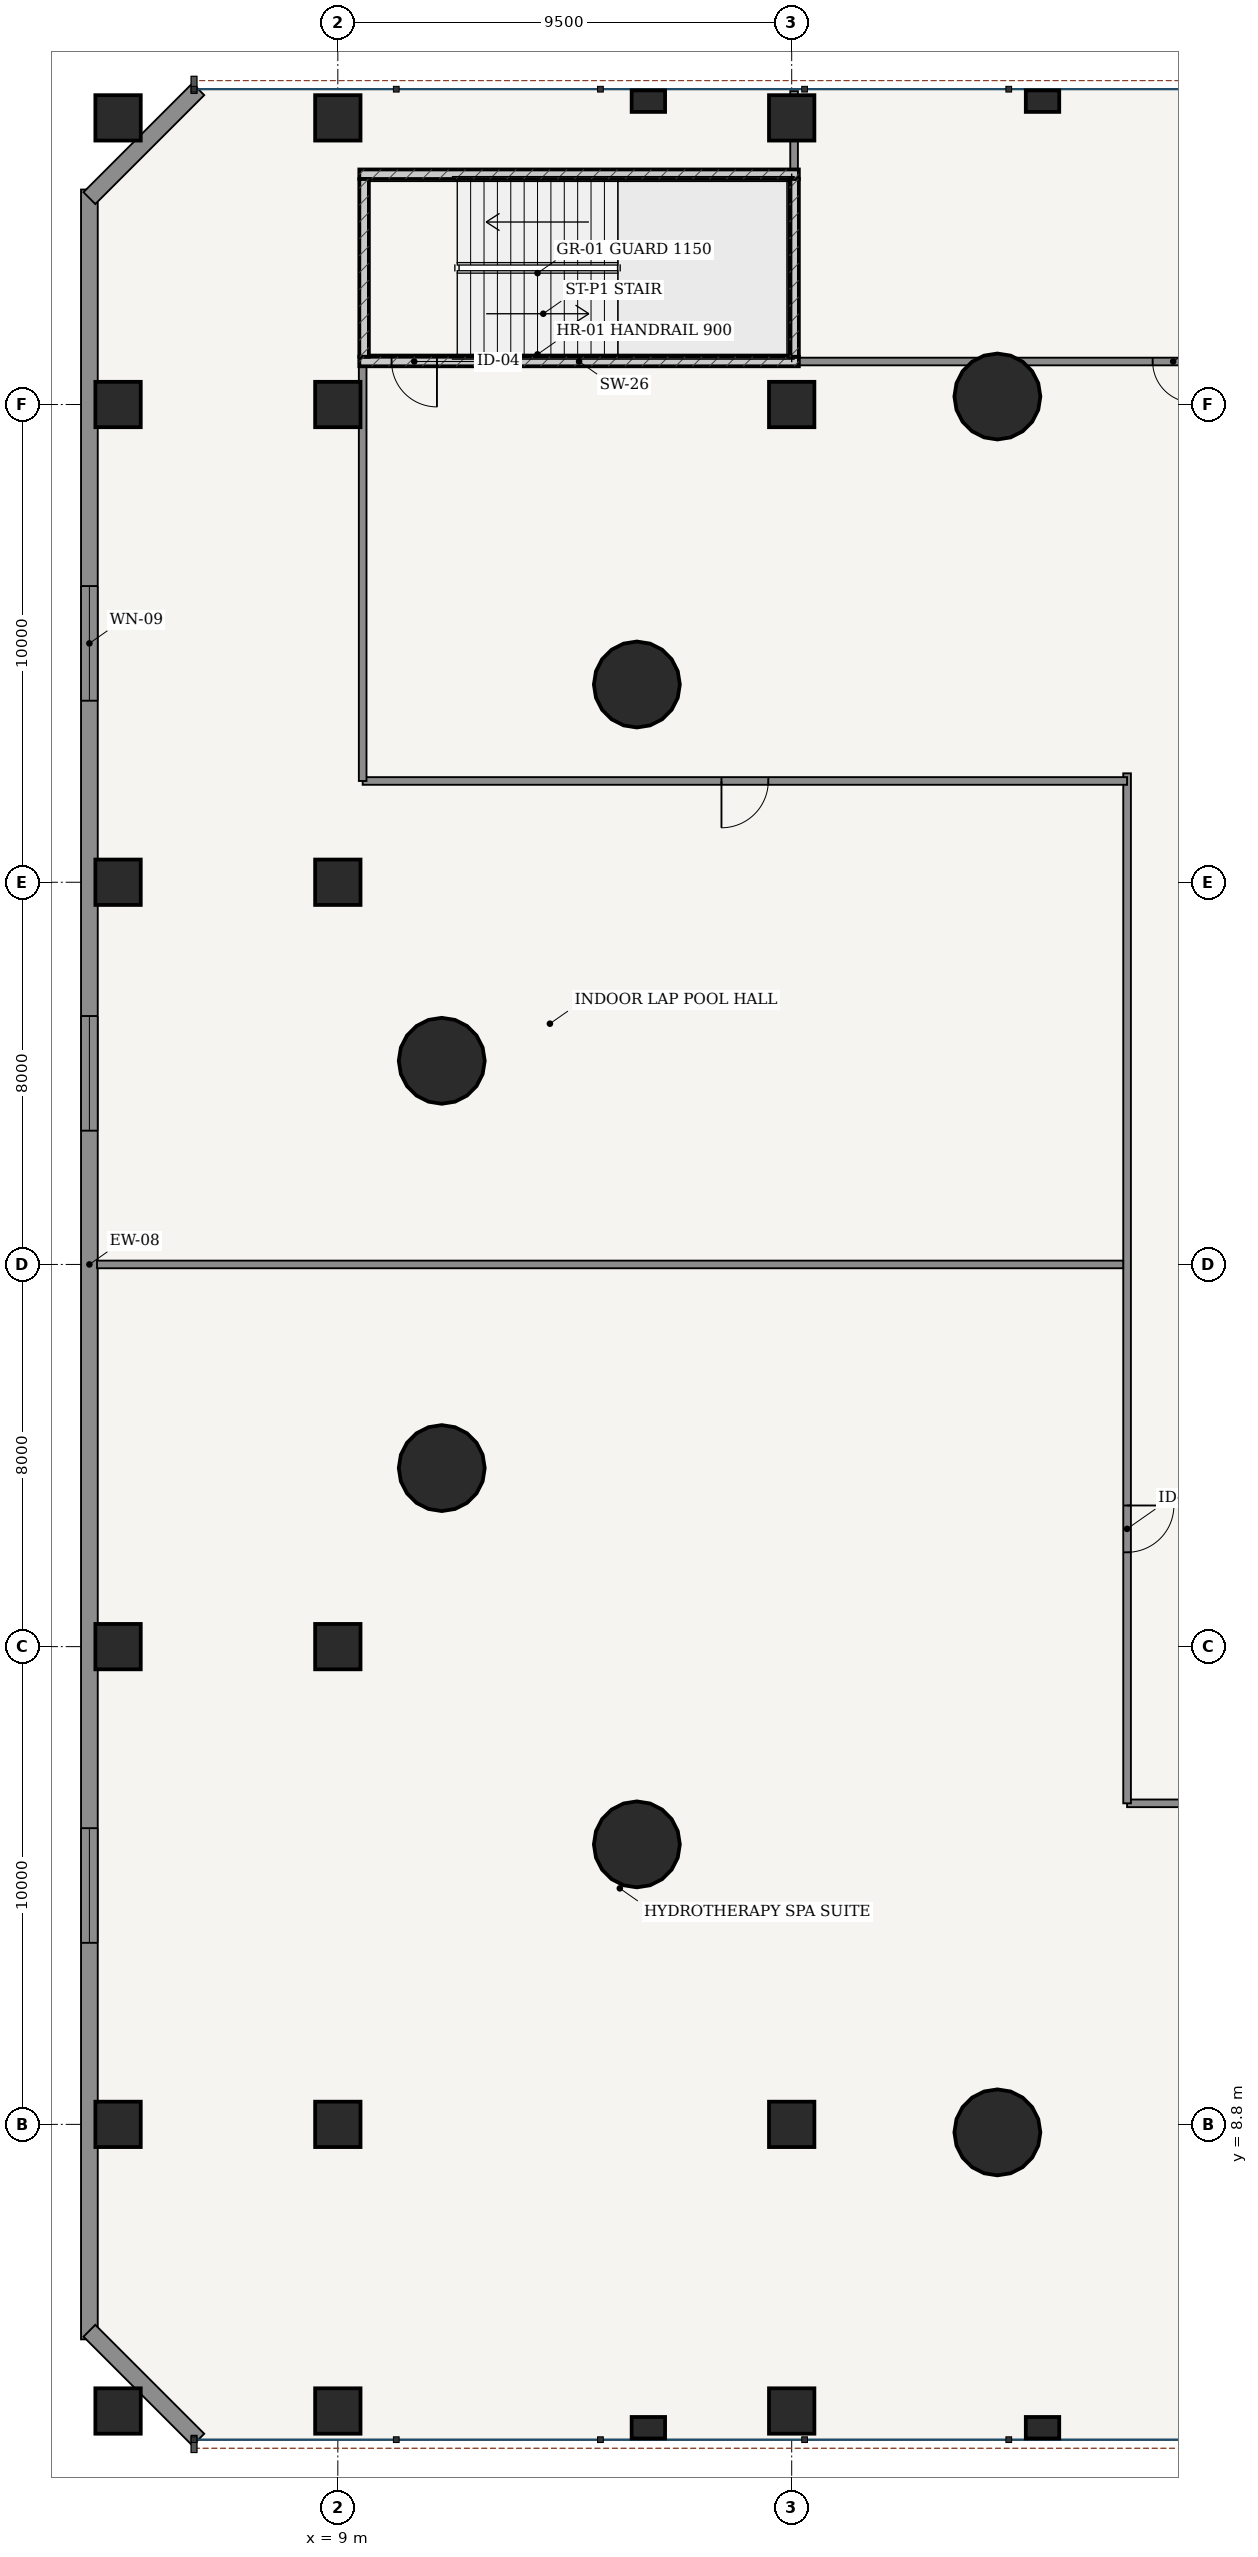
"""IFC4 building model, lengths in metres.
Left out: names, types, materials, properties, quantities, classifications, styles, units other than length and angle.
Written with IfcOpenShell. Run it as: python <this file> out.ifc"""

import sys

from ifc_helpers import new_model, si_unit, direction, frame, frame_2d, origin, origin_2d, place, context, subcontext, project, spatial, rectangle, hollow_circle, extrude, source, transform, mapped, element, fill, save


model = new_model("IFC4")
c1 = context("Model", 3, precision=1e-05, world=origin(), true_north=direction((-0.2419218956, 0.970295726276)))
c2 = subcontext(c1, "Body", "Model", "MODEL_VIEW")
j1 = project(units=[si_unit("LENGTHUNIT", "METRE"), si_unit("PLANEANGLEUNIT", "RADIAN")], contexts=[c1])
p1 = place(None, origin())
s1 = spatial("IfcSite", under=j1, at=p1, CompositionType="ELEMENT")
p2 = place(p1, origin())
s2 = spatial("IfcBuilding", under=s1, at=p2, CompositionType="ELEMENT")
p3 = place(p2, frame((0.0, 0.0, 14.4)))
s3 = spatial("IfcBuildingStorey", under=s2, at=p3, CompositionType="ELEMENT", Elevation=14.4)
p4 = place(p3, frame((9.45, 45.7, 0.0), z_axis=(0.0, 0.0, 1.0), x_axis=(1.0, 0.0, 0.0)))
e1 = element("IfcWall", 1, at=p4, inside=s3, PredefinedType="SOLIDWALL", context=c2, shape_type="SweptSolid", body=[
    extrude(rectangle(XDim=9.2, YDim=0.2, at=frame_2d((4.6, 0.0))), origin(), (0.0, 0.0, 1.0), 4.05),
])
p5 = place(p4, frame((0.675, 0.0, 0.0)))
e2 = element("IfcOpeningElement", 2, at=p5, cuts=e1, PredefinedType="OPENING", context=c2, shape_type="SweptSolid", body=[
    extrude(rectangle(XDim=0.95, YDim=2.15, at=frame_2d((0.475, 1.075))), frame((0.0, 0.11, 0.0), z_axis=(0.0, -1.0, 0.0), x_axis=(1.0, 0.0, 0.0)), (0.0, 0.0, 1.0), 0.22),
])
p6 = place(p3, frame((9.45, 49.62, 0.0), z_axis=(0.0, 0.0, 1.0), x_axis=(1.0, 0.0, 0.0)))
e3 = element("IfcWall", 3, at=p6, inside=s3, PredefinedType="SOLIDWALL", context=c2, shape_type="SweptSolid", body=[
    extrude(rectangle(XDim=9.2, YDim=0.2, at=frame_2d((4.6, 0.0))), origin(), (0.0, 0.0, 1.0), 4.05),
])
for number, where, z_axis, x_axis in (
    (4, (9.55, 45.8, 0.0), (0.0, 0.0, 1.0), (0.0, 1.0, 0.0)),
    (5, (18.55, 45.8, 0.0), (0.0, 0.0, 1.0), (0.0, 1.0, 0.0)),
):
    element("IfcWall", number, at=place(p3, frame(where, z_axis=z_axis, x_axis=x_axis)), inside=s3, PredefinedType="SOLIDWALL", context=c2, shape_type="SweptSolid", body=[
        extrude(rectangle(XDim=3.72, YDim=0.2, at=frame_2d((1.86, 0.0))), origin(), (0.0, 0.0, 1.0), 4.05),
    ])
for number, where, z_axis, x_axis in (
    (6, (22.805, 44.968, 0.0), (0.0, 0.0, 1.0), (1.0, 0.0, 0.0)),
    (7, (15.259, 38.939, 0.0), (0.0, 0.0, 1.0), (1.0, 0.0, 0.0)),
    (8, (11.176, 31.063, 0.0), (0.0, 0.0, 1.0), (1.0, 0.0, 0.0)),
    (9, (11.176, 22.537, 0.0), (0.0, 0.0, 1.0), (1.0, 0.0, 0.0)),
    (10, (15.259, 14.661, 0.0), (0.0, 0.0, 1.0), (1.0, 0.0, 0.0)),
    (11, (22.805, 8.632, 0.0), (0.0, 0.0, 1.0), (1.0, 0.0, 0.0)),
):
    element("IfcColumn", number, at=place(p3, frame(where, z_axis=z_axis, x_axis=x_axis)), inside=s3, PredefinedType="COLUMN", context=c2, shape_type="SweptSolid", body=[
        extrude(hollow_circle(Radius=0.9, WallThickness=0.055, at=origin_2d()), origin(), (0.0, 0.0, 1.0), 4.5),
    ])
for number, where, z_axis, x_axis in (
    (12, (4.4, 2.8, 0.0), (0.0, 0.0, 1.0), (1.0, 0.0, 0.0)),
    (13, (4.4, 8.8, 0.0), (0.0, 0.0, 1.0), (1.0, 0.0, 0.0)),
    (14, (4.4, 18.8, 0.0), (0.0, 0.0, 1.0), (1.0, 0.0, 0.0)),
    (15, (4.4, 34.8, 0.0), (0.0, 0.0, 1.0), (1.0, 0.0, 0.0)),
    (16, (4.4, 44.8, 0.0), (0.0, 0.0, 1.0), (1.0, 0.0, 0.0)),
    (17, (4.4, 50.8, 0.0), (0.0, 0.0, 1.0), (1.0, 0.0, 0.0)),
    (18, (9.0, 2.8, 0.0), (0.0, 0.0, 1.0), (1.0, 0.0, 0.0)),
    (19, (9.0, 8.8, 0.0), (0.0, 0.0, 1.0), (1.0, 0.0, 0.0)),
    (20, (9.0, 18.8, 0.0), (0.0, 0.0, 1.0), (1.0, 0.0, 0.0)),
    (21, (9.0, 34.8, 0.0), (0.0, 0.0, 1.0), (1.0, 0.0, 0.0)),
    (22, (9.0, 44.8, 0.0), (0.0, 0.0, 1.0), (1.0, 0.0, 0.0)),
    (23, (9.0, 50.8, 0.0), (0.0, 0.0, 1.0), (1.0, 0.0, 0.0)),
    (24, (18.5, 2.8, 0.0), (0.0, 0.0, 1.0), (1.0, 0.0, 0.0)),
    (25, (18.5, 8.8, 0.0), (0.0, 0.0, 1.0), (1.0, 0.0, 0.0)),
    (26, (18.5, 44.8, 0.0), (0.0, 0.0, 1.0), (1.0, 0.0, 0.0)),
    (27, (18.5, 50.8, 0.0), (0.0, 0.0, 1.0), (1.0, 0.0, 0.0)),
):
    element("IfcColumn", number, at=place(p3, frame(where, z_axis=z_axis, x_axis=x_axis)), inside=s3, PredefinedType="COLUMN", context=c2, shape_type="SweptSolid", body=[
        extrude(rectangle(XDim=0.95, YDim=0.95, at=origin_2d()), origin(), (0.0, 0.0, 1.0), 4.5),
    ])
for number, where, z_axis, x_axis in (
    (28, (15.5, 2.45, 0.0), (0.0, 0.0, 1.0), (1.0, 0.0, 0.0)),
    (29, (15.5, 51.15, 0.0), (0.0, 0.0, 1.0), (1.0, 0.0, 0.0)),
    (30, (23.75, 2.45, 0.0), (0.0, 0.0, 1.0), (1.0, 0.0, 0.0)),
    (31, (23.75, 51.15, 0.0), (0.0, 0.0, 1.0), (1.0, 0.0, 0.0)),
):
    element("IfcColumn", number, at=place(p3, frame(where, z_axis=z_axis, x_axis=x_axis)), inside=s3, PredefinedType="PILASTER", context=c2, shape_type="SweptSolid", body=[
        extrude(rectangle(XDim=0.7, YDim=0.45, at=origin_2d()), origin(), (0.0, 0.0, 1.0), 4.5),
    ])
p7 = place(p3, frame((3.8, 49.3, 0.0), z_axis=(0.0, 0.0, 1.0), x_axis=(0.0, -1.0, 0.0)))
e32 = element("IfcWall", 32, at=p7, inside=s3, PredefinedType="SOLIDWALL", context=c2, shape_type="SweptSolid", body=[
    extrude(rectangle(XDim=45.0, YDim=0.35, at=frame_2d((22.5, 0.0))), origin(), (0.0, 0.0, 1.0), 4.05),
])
p8 = place(p7, frame((8.3, 0.0, 0.85)))
e33 = element("IfcOpeningElement", 33, at=p8, cuts=e32, PredefinedType="OPENING", context=c2, shape_type="SweptSolid", body=[
    extrude(rectangle(XDim=2.4, YDim=2.2, at=frame_2d((1.2, 1.1))), frame((0.0, 0.185, 0.0), z_axis=(0.0, -1.0, 0.0), x_axis=(1.0, 0.0, 0.0)), (0.0, 0.0, 1.0), 0.37),
])
p9 = place(p7, frame((17.3, 0.0, 0.85)))
e34 = element("IfcOpeningElement", 34, at=p9, cuts=e32, PredefinedType="OPENING", context=c2, shape_type="SweptSolid", body=[
    extrude(rectangle(XDim=2.4, YDim=2.2, at=frame_2d((1.2, 1.1))), frame((0.0, 0.185, 0.0), z_axis=(0.0, -1.0, 0.0), x_axis=(1.0, 0.0, 0.0)), (0.0, 0.0, 1.0), 0.37),
])
p10 = place(p7, frame((34.3, 0.0, 0.85)))
e35 = element("IfcOpeningElement", 35, at=p10, cuts=e32, PredefinedType="OPENING", context=c2, shape_type="SweptSolid", body=[
    extrude(rectangle(XDim=2.4, YDim=2.2, at=frame_2d((1.2, 1.1))), frame((0.0, 0.185, 0.0), z_axis=(0.0, -1.0, 0.0), x_axis=(1.0, 0.0, 0.0)), (0.0, 0.0, 1.0), 0.37),
])
for number, where, z_axis, x_axis in (
    (36, (3.8, 4.48, 0.0), (0.0, 0.0, 1.0), (0.707, -0.707, 0.0)),
    (37, (6.08, 51.4, 0.0), (0.0, 0.0, 1.0), (-0.707, -0.707, 0.0)),
):
    element("IfcWall", number, at=place(p3, frame(where, z_axis=z_axis, x_axis=x_axis)), inside=s3, PredefinedType="SOLIDWALL", context=c2, shape_type="SweptSolid", body=[
        extrude(rectangle(XDim=3.224, YDim=0.35, at=frame_2d((1.612, 0.0))), origin(), (0.0, 0.0, 1.0), 3.085),
    ])
p11 = place(p3, frame((25.52, 15.52, 0.0), z_axis=(0.0, 0.0, 1.0), x_axis=(1.0, 0.0, 0.0)))
e38 = element("IfcWall", 38, at=p11, inside=s3, PredefinedType="PARTITIONING", context=c2, shape_type="SweptSolid", body=[
    extrude(rectangle(XDim=24.96, YDim=0.16, at=frame_2d((12.48, 0.0))), origin(), (0.0, 0.0, 1.0), 3.4),
])
p12 = place(p11, frame((5.854, 0.0, 0.0)))
e39 = element("IfcOpeningElement", 39, at=p12, cuts=e38, PredefinedType="OPENING", context=c2, shape_type="SweptSolid", body=[
    extrude(rectangle(XDim=0.98, YDim=2.2, at=frame_2d((0.49, 1.1))), frame((0.0, 0.09, 0.0), z_axis=(0.0, -1.0, 0.0), x_axis=(1.0, 0.0, 0.0)), (0.0, 0.0, 1.0), 0.18),
])
p13 = place(p11, frame((18.125, 0.0, 0.0)))
e40 = element("IfcOpeningElement", 40, at=p13, cuts=e38, PredefinedType="OPENING", context=c2, shape_type="SweptSolid", body=[
    extrude(rectangle(XDim=0.98, YDim=2.2, at=frame_2d((0.49, 1.1))), frame((0.0, 0.09, 0.0), z_axis=(0.0, -1.0, 0.0), x_axis=(1.0, 0.0, 0.0)), (0.0, 0.0, 1.0), 0.18),
])
p14 = place(p3, frame((25.52, 15.52, 0.0), z_axis=(0.0, 0.0, 1.0), x_axis=(0.0, 1.0, 0.0)))
e41 = element("IfcWall", 41, at=p14, inside=s3, PredefinedType="PARTITIONING", context=c2, shape_type="SweptSolid", body=[
    extrude(rectangle(XDim=21.56, YDim=0.16, at=frame_2d((10.78, 0.0))), origin(), (0.0, 0.0, 1.0), 3.4),
])
p15 = place(p14, frame((5.254, 0.0, 0.0)))
e42 = element("IfcOpeningElement", 42, at=p15, cuts=e41, PredefinedType="OPENING", context=c2, shape_type="SweptSolid", body=[
    extrude(rectangle(XDim=0.98, YDim=2.2, at=frame_2d((0.49, 1.1))), frame((0.0, 0.09, 0.0), z_axis=(0.0, -1.0, 0.0), x_axis=(1.0, 0.0, 0.0)), (0.0, 0.0, 1.0), 0.18),
])
p16 = place(p3, frame((9.52, 36.92, 0.0), z_axis=(0.0, 0.0, 1.0), x_axis=(1.0, 0.0, 0.0)))
e43 = element("IfcWall", 43, at=p16, inside=s3, PredefinedType="PARTITIONING", context=c2, shape_type="SweptSolid", body=[
    extrude(rectangle(XDim=16.0, YDim=0.16, at=frame_2d((8.0, 0.0))), origin(), (0.0, 0.0, 1.0), 3.4),
])
p17 = place(p16, frame((7.51, 0.0, 0.0)))
e44 = element("IfcOpeningElement", 44, at=p17, cuts=e43, PredefinedType="OPENING", context=c2, shape_type="SweptSolid", body=[
    extrude(rectangle(XDim=0.98, YDim=2.2, at=frame_2d((0.49, 1.1))), frame((0.0, 0.09, 0.0), z_axis=(0.0, -1.0, 0.0), x_axis=(1.0, 0.0, 0.0)), (0.0, 0.0, 1.0), 0.18),
])
p18 = place(p3, frame((9.52, 36.92, 0.0), z_axis=(0.0, 0.0, 1.0), x_axis=(0.0, 1.0, 0.0)))
e45 = element("IfcWall", 45, at=p18, inside=s3, PredefinedType="PARTITIONING", context=c2, shape_type="SweptSolid", body=[
    extrude(rectangle(XDim=8.78, YDim=0.16, at=frame_2d((4.39, 0.0))), origin(), (0.0, 0.0, 1.0), 2.435),
])
p19 = place(p3, frame((18.55, 45.7, 0.0), z_axis=(0.0, 0.0, 1.0), x_axis=(1.0, 0.0, 0.0)))
e46 = element("IfcWall", 46, at=p19, inside=s3, PredefinedType="PARTITIONING", context=c2, shape_type="SweptSolid", body=[
    extrude(rectangle(XDim=38.9, YDim=0.16, at=frame_2d((19.45, 0.0))), origin(), (0.0, 0.0, 1.0), 3.4),
])
p20 = place(p19, frame((7.505, 0.0, 0.0)))
e47 = element("IfcOpeningElement", 47, at=p20, cuts=e46, PredefinedType="OPENING", context=c2, shape_type="SweptSolid", body=[
    extrude(rectangle(XDim=0.86, YDim=2.1, at=frame_2d((0.43, 1.05))), frame((0.0, 0.09, 0.0), z_axis=(0.0, -1.0, 0.0), x_axis=(1.0, 0.0, 0.0)), (0.0, 0.0, 1.0), 0.18),
])
p21 = place(p19, frame((19.02, 0.0, 0.0)))
e48 = element("IfcOpeningElement", 48, at=p21, cuts=e46, PredefinedType="OPENING", context=c2, shape_type="SweptSolid", body=[
    extrude(rectangle(XDim=0.86, YDim=2.1, at=frame_2d((0.43, 1.05))), frame((0.0, 0.09, 0.0), z_axis=(0.0, -1.0, 0.0), x_axis=(1.0, 0.0, 0.0)), (0.0, 0.0, 1.0), 0.18),
])
p22 = place(p19, frame((30.475, 0.0, 0.0)))
e49 = element("IfcOpeningElement", 49, at=p22, cuts=e46, PredefinedType="OPENING", context=c2, shape_type="SweptSolid", body=[
    extrude(rectangle(XDim=0.98, YDim=2.2, at=frame_2d((0.49, 1.1))), frame((0.0, 0.09, 0.0), z_axis=(0.0, -1.0, 0.0), x_axis=(1.0, 0.0, 0.0)), (0.0, 0.0, 1.0), 0.18),
])
p23 = place(p3, frame((3.96, 26.8, 0.0), z_axis=(0.0, 0.0, 1.0), x_axis=(1.0, 0.0, 0.0)))
e50 = element("IfcWall", 50, at=p23, inside=s3, PredefinedType="PARTITIONING", context=c2, shape_type="SweptSolid", body=[
    extrude(rectangle(XDim=21.478, YDim=0.16, at=frame_2d((10.739, 0.0))), origin(), (0.0, 0.0, 1.0), 3.492),
])
p24 = place(p3, frame((18.55, 49.722, 0.0), z_axis=(0.0, 0.0, 1.0), x_axis=(0.0, 1.0, 0.0)))
e51 = element("IfcWall", 51, at=p24, inside=s3, PredefinedType="PARTITIONING", context=c2, shape_type="SweptSolid", body=[
    extrude(rectangle(XDim=1.638, YDim=0.16, at=frame_2d((0.819, 0.0))), origin(), (0.0, 0.0, 1.0), 3.085),
])
m1 = source(origin(), c2, "Body", "SweptSolid", [
    extrude(rectangle(XDim=2.4, YDim=2.2, at=frame_2d((1.2, 1.1))), frame((0.0, 0.03, 0.0), z_axis=(0.0, -1.0, 0.0), x_axis=(1.0, 0.0, 0.0)), (0.0, 0.0, 1.0), 0.06),
])
p25 = place(p8, origin())
e52 = element("IfcWindow", 52, at=p25, inside=s3, PartitioningType="SINGLE_PANEL", PredefinedType="WINDOW", context=c2, shape_type="MappedRepresentation", body=[
    mapped(m1, transform((0.0, 0.0, 0.0), scale=1.0)),
])
fill(e33, e52)
p26 = place(p9, origin())
e53 = element("IfcWindow", 53, at=p26, inside=s3, PartitioningType="SINGLE_PANEL", PredefinedType="WINDOW", context=c2, shape_type="MappedRepresentation", body=[
    mapped(m1, transform((0.0, 0.0, 0.0), scale=1.0)),
])
fill(e34, e53)
p27 = place(p10, origin())
e54 = element("IfcWindow", 54, at=p27, inside=s3, PartitioningType="SINGLE_PANEL", PredefinedType="WINDOW", context=c2, shape_type="MappedRepresentation", body=[
    mapped(m1, transform((0.0, 0.0, 0.0), scale=1.0)),
])
fill(e35, e54)
m2 = source(origin(), c2, "Body", "SweptSolid", [
    extrude(rectangle(XDim=0.95, YDim=2.15, at=frame_2d((0.475, 1.075))), frame((0.0, 0.025, 0.0), z_axis=(0.0, -1.0, 0.0), x_axis=(1.0, 0.0, 0.0)), (0.0, 0.0, 1.0), 0.05),
])
p28 = place(p5, frame((0.95, 0.0, 0.0), z_axis=(0.0, 0.0, 1.0), x_axis=(-1.0, 0.0, 0.0)))
e55 = element("IfcDoor", 55, at=p28, inside=s3, OperationType="SINGLE_SWING_LEFT", PredefinedType="DOOR", context=c2, shape_type="MappedRepresentation", body=[
    mapped(m2, transform((0.0, 0.0, 0.0), scale=1.0)),
])
fill(e2, e55)
m3 = source(origin(), c2, "Body", "SweptSolid", [
    extrude(rectangle(XDim=0.98, YDim=2.2, at=frame_2d((0.49, 1.1))), frame((0.0, 0.025, 0.0), z_axis=(0.0, -1.0, 0.0), x_axis=(1.0, 0.0, 0.0)), (0.0, 0.0, 1.0), 0.05),
])
p29 = place(p15, frame((0.98, 0.0, 0.0), z_axis=(0.0, 0.0, 1.0), x_axis=(-1.0, 0.0, 0.0)))
e56 = element("IfcDoor", 56, at=p29, inside=s3, OperationType="SINGLE_SWING_LEFT", PredefinedType="DOOR", context=c2, shape_type="MappedRepresentation", body=[
    mapped(m3, transform((0.0, 0.0, 0.0), scale=1.0)),
])
fill(e42, e56)
p30 = place(p17, frame((0.98, 0.0, 0.0), z_axis=(0.0, 0.0, 1.0), x_axis=(-1.0, 0.0, 0.0)))
e57 = element("IfcDoor", 57, at=p30, inside=s3, OperationType="SINGLE_SWING_RIGHT", PredefinedType="DOOR", context=c2, shape_type="MappedRepresentation", body=[
    mapped(m3, transform((0.0, 0.0, 0.0), scale=1.0)),
])
fill(e44, e57)
m4 = source(origin(), c2, "Body", "SweptSolid", [
    extrude(rectangle(XDim=0.86, YDim=2.1, at=frame_2d((0.43, 1.05))), frame((0.0, 0.025, 0.0), z_axis=(0.0, -1.0, 0.0), x_axis=(1.0, 0.0, 0.0)), (0.0, 0.0, 1.0), 0.05),
])
p31 = place(p20, frame((0.86, 0.0, 0.0), z_axis=(0.0, 0.0, 1.0), x_axis=(-1.0, 0.0, 0.0)))
e58 = element("IfcDoor", 58, at=p31, inside=s3, OperationType="SINGLE_SWING_LEFT", PredefinedType="DOOR", context=c2, shape_type="MappedRepresentation", body=[
    mapped(m4, transform((0.0, 0.0, 0.0), scale=1.0)),
])
fill(e47, e58)
save(model, sys.argv[1])
